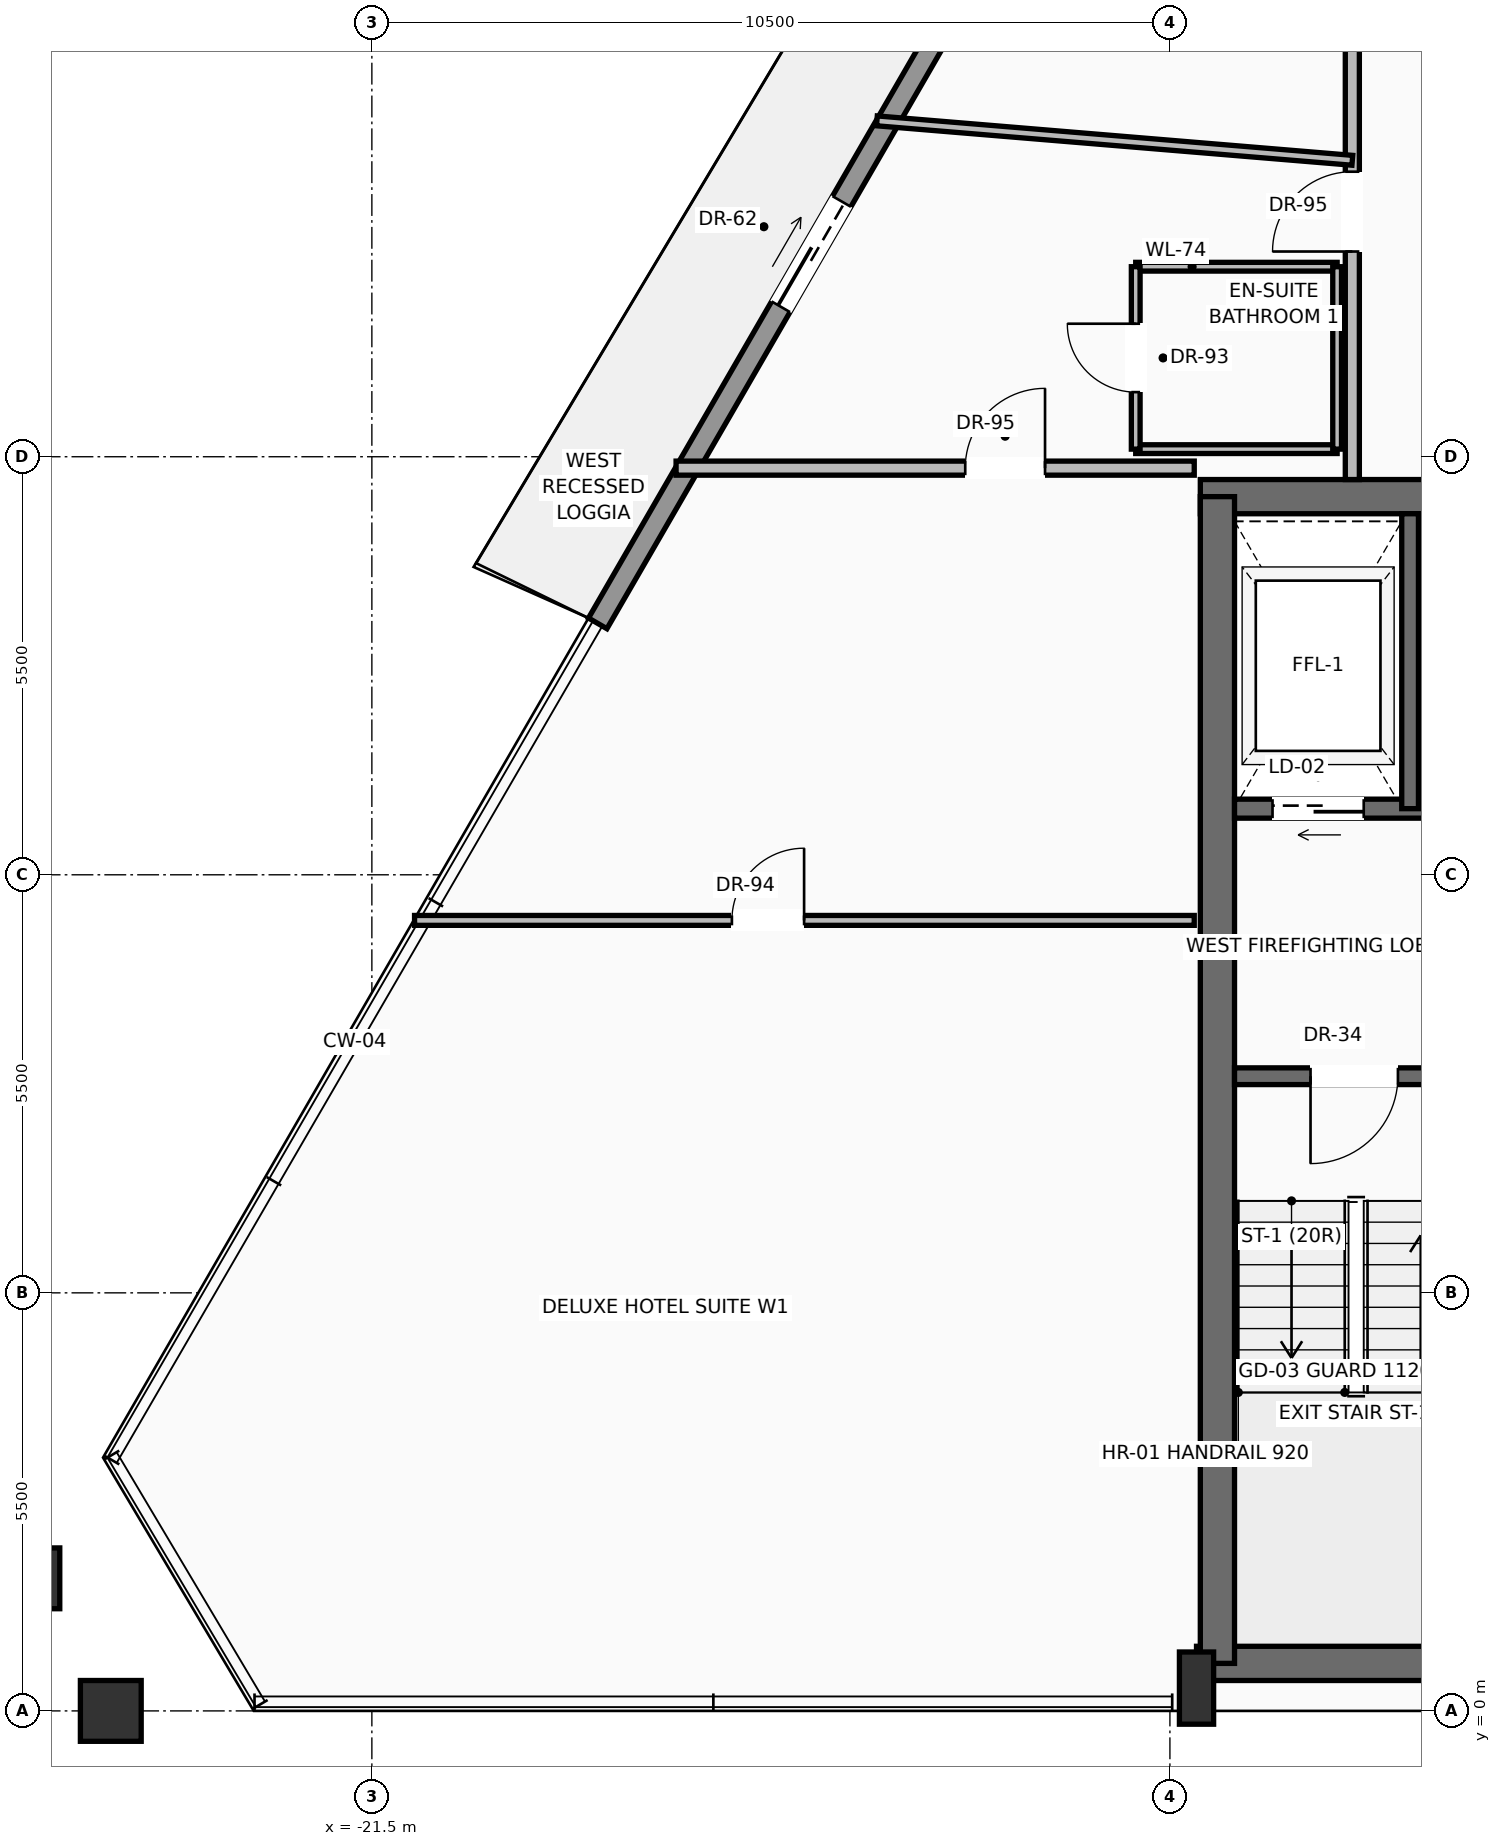
"""IFC4 building model, lengths in metres.
Left out: names, types, materials, properties, quantities, classifications, styles, units other than length and angle.
Written with IfcOpenShell. Run it as: python <this file> out.ifc"""

import sys

from ifc_helpers import new_model, si_unit, direction, frame, frame_2d, origin, origin_2d, place, context, subcontext, project, spatial, rectangle, hollow_rectangle, extrude, source, transform, mapped, element, fill, save


model = new_model("IFC4")
c1 = context("Model", 3, precision=1e-05, world=origin(), true_north=direction((0.0, 1.0)))
c2 = subcontext(c1, "Body", "Model", "MODEL_VIEW")
j1 = project(units=[si_unit("LENGTHUNIT", "METRE"), si_unit("PLANEANGLEUNIT", "RADIAN")], contexts=[c1])
p1 = place(None, origin())
s1 = spatial("IfcSite", under=j1, at=p1, CompositionType="ELEMENT")
p2 = place(p1, origin())
s2 = spatial("IfcBuilding", under=s1, at=p2, CompositionType="ELEMENT")
p3 = place(p2, frame((0.0, 0.0, 273.0)))
s3 = spatial("IfcBuildingStorey", under=s2, at=p3, CompositionType="ELEMENT", Elevation=273.0)
p4 = place(p3, frame((-10.65, 0.625, 0.0), z_axis=(0.0, 0.0, 1.0), x_axis=(1.0, 0.0, 0.0)))
e1 = element("IfcWall", 1, at=p4, inside=s3, PredefinedType="SHEAR", context=c2, shape_type="SweptSolid", body=[
    extrude(rectangle(XDim=21.3, YDim=0.45, at=frame_2d((10.65, 0.0))), origin(), (0.0, 0.0, 1.0), 3.24),
])
p5 = place(p3, frame((-10.6, 15.975, 0.0), z_axis=(0.0, 0.0, 1.0), x_axis=(1.0, 0.0, 0.0)))
e2 = element("IfcWall", 2, at=p5, inside=s3, PredefinedType="SHEAR", context=c2, shape_type="SweptSolid", body=[
    extrude(rectangle(XDim=21.2, YDim=0.45, at=frame_2d((10.6, 0.0))), origin(), (0.0, 0.0, 1.0), 3.24),
])
p6 = place(p5, frame((3.17, 0.0, 0.0)))
e3 = element("IfcOpeningElement", 3, at=p6, cuts=e2, PredefinedType="OPENING", context=c2, shape_type="SweptSolid", body=[
    extrude(rectangle(XDim=1.3, YDim=2.3, at=frame_2d((0.65, 1.15))), frame((0.0, 0.235, 0.0), z_axis=(0.0, -1.0, 0.0), x_axis=(1.0, 0.0, 0.0)), (0.0, 0.0, 1.0), 0.47),
])
p7 = place(p5, frame((9.6, 0.0, 0.0)))
e4 = element("IfcOpeningElement", 4, at=p7, cuts=e2, PredefinedType="OPENING", context=c2, shape_type="SweptSolid", body=[
    extrude(rectangle(XDim=2.0, YDim=2.4, at=frame_2d((1.0, 1.2))), frame((0.0, 0.235, 0.0), z_axis=(0.0, -1.0, 0.0), x_axis=(1.0, 0.0, 0.0)), (0.0, 0.0, 1.0), 0.47),
])
p8 = place(p3, frame((-10.375, 0.625, 0.0), z_axis=(0.0, 0.0, 1.0), x_axis=(0.0, 1.0, 0.0)))
e5 = element("IfcWall", 5, at=p8, inside=s3, PredefinedType="SHEAR", context=c2, shape_type="SweptSolid", body=[
    extrude(rectangle(XDim=15.35, YDim=0.45, at=frame_2d((7.675, 0.0))), origin(), (0.0, 0.0, 1.0), 3.24),
])
m1 = source(origin(), c2, "Body", "SweptSolid", [
    extrude(rectangle(XDim=0.45, YDim=0.95, at=origin_2d()), origin(), (0.0, 0.0, 1.0), 3.45),
])
p9 = place(p3, frame((-10.65, 0.3, 0.0), z_axis=(0.0, 0.0, 1.0), x_axis=(1.0, 0.0, 0.0)))
e6 = element("IfcColumn", 6, at=p9, inside=s3, PredefinedType="PILASTER", context=c2, shape_type="MappedRepresentation", body=[
    mapped(m1, transform((0.0, 0.0, 0.0), scale=1.0)),
])
m2 = source(origin(), c2, "Body", "SweptSolid", [
    extrude(hollow_rectangle(XDim=0.8, YDim=0.8, WallThickness=0.04, at=origin_2d()), origin(), (0.0, 0.0, 1.0), 3.441),
])
p10 = place(p3, frame((-24.935, 0.0, 0.004), z_axis=(0.000851365424, 0.0, 0.999999637588), x_axis=(1.0, 0.0, 0.0)))
e7 = element("IfcColumn", 7, at=p10, inside=s3, PredefinedType="COLUMN", context=c2, shape_type="MappedRepresentation", body=[
    mapped(m2, transform((0.0, 0.0, 0.0), scale=1.0)),
])
m3 = source(origin(), c2, "Body", "SweptSolid", [
    extrude(hollow_rectangle(XDim=0.8, YDim=0.8, WallThickness=0.04, at=origin_2d()), origin(), (0.0, 0.0, 1.0), 3.442),
])
p11 = place(p3, frame((-26.006, 1.744, 0.004), z_axis=(0.01220033377, -0.016527196327, 0.999788979554), x_axis=(0.804534796684, 0.593905515149, 0.0)))
e8 = element("IfcColumn", 8, at=p11, inside=s3, PredefinedType="COLUMN", context=c2, shape_type="MappedRepresentation", body=[
    mapped(m3, transform((0.0, 0.0, 0.0), scale=1.0)),
])
p12 = place(p3, frame((-18.529, 14.308, 0.0), z_axis=(0.0, 0.0, 1.0), x_axis=(0.500615740451, 0.86566961389, 0.0)))
e9 = element("IfcWall", 9, at=p12, inside=s3, PredefinedType="SOLIDWALL", context=c2, shape_type="SweptSolid", body=[
    extrude(rectangle(XDim=20.05, YDim=0.28, at=frame_2d((10.025, 0.0))), origin(), (0.0, 0.0, 1.0), 2.82),
])
p13 = place(p12, frame((4.812, 0.0, 0.0)))
e10 = element("IfcOpeningElement", 10, at=p13, cuts=e9, PredefinedType="OPENING", context=c2, shape_type="SweptSolid", body=[
    extrude(rectangle(XDim=1.6, YDim=2.35, at=frame_2d((0.8, 1.175))), frame((0.0, 0.15, 0.0), z_axis=(0.0, -1.0, 0.0), x_axis=(1.0, 0.0, 0.0)), (0.0, 0.0, 1.0), 0.3),
])
p14 = place(p12, frame((13.634, 0.0, 0.9)))
e11 = element("IfcOpeningElement", 11, at=p14, cuts=e9, PredefinedType="OPENING", context=c2, shape_type="SweptSolid", body=[
    extrude(rectangle(XDim=1.55, YDim=1.75, at=frame_2d((0.775, 0.875))), frame((0.0, 0.15, 0.0), z_axis=(0.0, -1.0, 0.0), x_axis=(1.0, 0.0, 0.0)), (0.0, 0.0, 1.0), 0.3),
])
p15 = place(p3, frame((-5.5, 8.35, 0.0), z_axis=(0.0, 0.0, 1.0), x_axis=(-1.0, 0.0, 0.0)))
e12 = element("IfcWall", 12, at=p15, inside=s3, PredefinedType="SOLIDWALL", context=c2, shape_type="SweptSolid", body=[
    extrude(rectangle(XDim=4.65, YDim=0.22, at=frame_2d((2.325, 0.0))), origin(), (0.0, 0.0, 1.0), 3.24),
])
p16 = place(p15, frame((2.5, 0.0, 0.0)))
e13 = element("IfcOpeningElement", 13, at=p16, cuts=e12, PredefinedType="OPENING", context=c2, shape_type="SweptSolid", body=[
    extrude(rectangle(XDim=1.15, YDim=2.2, at=frame_2d((0.575, 1.1))), frame((0.0, 0.12, 0.0), z_axis=(0.0, -1.0, 0.0), x_axis=(1.0, 0.0, 0.0)), (0.0, 0.0, 1.0), 0.24),
])
p17 = place(p3, frame((-5.5, 11.87, 0.0), z_axis=(0.0, 0.0, 1.0), x_axis=(-1.0, 0.0, 0.0)))
e14 = element("IfcWall", 14, at=p17, inside=s3, PredefinedType="SOLIDWALL", context=c2, shape_type="SweptSolid", body=[
    extrude(rectangle(XDim=4.65, YDim=0.25, at=frame_2d((2.325, 0.0))), origin(), (0.0, 0.0, 1.0), 3.24),
])
p18 = place(p17, frame((2.95, 0.0, 0.0)))
e15 = element("IfcOpeningElement", 15, at=p18, cuts=e14, PredefinedType="OPENING", context=c2, shape_type="SweptSolid", body=[
    extrude(rectangle(XDim=1.2, YDim=2.25, at=frame_2d((0.6, 1.125))), frame((0.0, 0.135, 0.0), z_axis=(0.0, -1.0, 0.0), x_axis=(1.0, 0.0, 0.0)), (0.0, 0.0, 1.0), 0.27),
])
p19 = place(p3, frame((-7.84, 11.87, 0.0), z_axis=(0.0, 0.0, 1.0), x_axis=(0.0, 1.0, 0.0)))
e16 = element("IfcWall", 16, at=p19, inside=s3, PredefinedType="SOLIDWALL", context=c2, shape_type="SweptSolid", body=[
    extrude(rectangle(XDim=3.88, YDim=0.22, at=frame_2d((1.94, 0.0))), origin(), (0.0, 0.0, 1.0), 3.24),
])
p20 = place(p3, frame((-8.6, 16.2, 0.0), z_axis=(0.0, 0.0, 1.0), x_axis=(0.0, 1.0, 0.0)))
e17 = element("IfcWall", 17, at=p20, inside=s3, PredefinedType="PARTITIONING", context=c2, shape_type="SweptSolid", body=[
    extrude(rectangle(XDim=13.8, YDim=0.185, at=frame_2d((6.9, 0.0))), origin(), (0.0, 0.0, 1.0), 3.232),
])
p21 = place(p20, frame((3.0, 0.0, 0.0)))
e18 = element("IfcOpeningElement", 18, at=p21, cuts=e17, PredefinedType="OPENING", context=c2, shape_type="SweptSolid", body=[
    extrude(rectangle(XDim=1.05, YDim=2.25, at=frame_2d((0.525, 1.125))), frame((0.0, 0.103, 0.0), z_axis=(0.0, -1.0, 0.0), x_axis=(1.0, 0.0, 0.0)), (0.0, 0.0, 1.0), 0.205),
])
p22 = place(p20, frame((7.088, 0.0, 0.0)))
e19 = element("IfcOpeningElement", 19, at=p22, cuts=e17, PredefinedType="OPENING", context=c2, shape_type="SweptSolid", body=[
    extrude(rectangle(XDim=1.05, YDim=2.25, at=frame_2d((0.525, 1.125))), frame((0.0, 0.103, 0.0), z_axis=(0.0, -1.0, 0.0), x_axis=(1.0, 0.0, 0.0)), (0.0, 0.0, 1.0), 0.205),
])
p23 = place(p3, frame((-17.498, 16.35, 0.0), z_axis=(0.0, 0.0, 1.0), x_axis=(1.0, 0.0, 0.0)))
e20 = element("IfcWall", 20, at=p23, inside=s3, PredefinedType="PARTITIONING", context=c2, shape_type="SweptSolid", body=[
    extrude(rectangle(XDim=6.818, YDim=0.185, at=frame_2d((3.409, 0.0))), origin(), (0.0, 0.0, 1.0), 3.232),
])
p24 = place(p23, frame((3.804, 0.0, 0.0)))
e21 = element("IfcOpeningElement", 21, at=p24, cuts=e20, PredefinedType="OPENING", context=c2, shape_type="SweptSolid", body=[
    extrude(rectangle(XDim=1.05, YDim=2.25, at=frame_2d((0.525, 1.125))), frame((0.0, 0.103, 0.0), z_axis=(0.0, -1.0, 0.0), x_axis=(1.0, 0.0, 0.0)), (0.0, 0.0, 1.0), 0.205),
])
p25 = place(p3, frame((-20.938, 10.4, 0.0), z_axis=(0.0, 0.0, 1.0), x_axis=(1.0, 0.0, 0.0)))
e22 = element("IfcWall", 22, at=p25, inside=s3, PredefinedType="PARTITIONING", context=c2, shape_type="SweptSolid", body=[
    extrude(rectangle(XDim=10.259, YDim=0.13, at=frame_2d((5.129, 0.0))), origin(), (0.0, 0.0, 1.0), 3.232),
])
p26 = place(p25, frame((4.175, 0.0, 0.0)))
e23 = element("IfcOpeningElement", 23, at=p26, cuts=e22, PredefinedType="OPENING", context=c2, shape_type="SweptSolid", body=[
    extrude(rectangle(XDim=0.95, YDim=2.2, at=frame_2d((0.475, 1.1))), frame((0.0, 0.075, 0.0), z_axis=(0.0, -1.0, 0.0), x_axis=(1.0, 0.0, 0.0)), (0.0, 0.0, 1.0), 0.15),
])
for number, where, z_axis, x_axis in (
    (24, (-11.45, 16.6, 0.0), (0.0, 0.0, 1.0), (1.0, 0.0, 0.0)),
    (25, (-11.45, 19.0, 0.0), (0.0, 0.0, 1.0), (1.0, 0.0, 0.0)),
):
    element("IfcWall", number, at=place(p3, frame(where, z_axis=z_axis, x_axis=x_axis)), inside=s3, PredefinedType="PARTITIONING", context=c2, shape_type="SweptSolid", body=[
        extrude(rectangle(XDim=2.65, YDim=0.115, at=frame_2d((1.325, 0.0))), origin(), (0.0, 0.0, 1.0), 3.232),
    ])
p27 = place(p3, frame((-11.45, 16.6, 0.0), z_axis=(0.0, 0.0, 1.0), x_axis=(0.0, 1.0, 0.0)))
e26 = element("IfcWall", 26, at=p27, inside=s3, PredefinedType="PARTITIONING", context=c2, shape_type="SweptSolid", body=[
    extrude(rectangle(XDim=2.4, YDim=0.115, at=frame_2d((1.2, 0.0))), origin(), (0.0, 0.0, 1.0), 3.232),
])
p28 = place(p27, frame((0.75, 0.0, 0.0)))
e27 = element("IfcOpeningElement", 27, at=p28, cuts=e26, PredefinedType="OPENING", context=c2, shape_type="SweptSolid", body=[
    extrude(rectangle(XDim=0.9, YDim=2.15, at=frame_2d((0.45, 1.075))), frame((0.0, 0.067, 0.0), z_axis=(0.0, -1.0, 0.0), x_axis=(1.0, 0.0, 0.0)), (0.0, 0.0, 1.0), 0.135),
])
p29 = place(p3, frame((-8.8, 16.6, 0.0), z_axis=(0.0, 0.0, 1.0), x_axis=(0.0, 1.0, 0.0)))
e28 = element("IfcWall", 28, at=p29, inside=s3, PredefinedType="PARTITIONING", context=c2, shape_type="SweptSolid", body=[
    extrude(rectangle(XDim=2.4, YDim=0.115, at=frame_2d((1.2, 0.0))), origin(), (0.0, 0.0, 1.0), 3.232),
])
p30 = place(p3, frame((-14.855, 20.919, 0.0), z_axis=(0.0, 0.0, 1.0), x_axis=(0.996575202115, -0.082691393322, 0.0)))
e29 = element("IfcWall", 29, at=p30, inside=s3, PredefinedType="PARTITIONING", context=c2, shape_type="SweptSolid", body=[
    extrude(rectangle(XDim=6.277, YDim=0.13, at=frame_2d((3.138, 0.0))), origin(), (0.0, 0.0, 1.0), 3.232),
])
m4 = source(origin(), c2, "Body", "SweptSolid", [
    extrude(rectangle(XDim=1.6, YDim=2.35, at=frame_2d((0.8, 1.175))), frame((0.0, 0.025, 0.0), z_axis=(0.0, -1.0, 0.0), x_axis=(1.0, 0.0, 0.0)), (0.0, 0.0, 1.0), 0.05),
])
p31 = place(p13, origin())
e30 = element("IfcDoor", 30, at=p31, inside=s3, OperationType="SLIDING_TO_LEFT", PredefinedType="DOOR", context=c2, shape_type="MappedRepresentation", body=[
    mapped(m4, transform((0.0, 0.0, 0.0), scale=1.0)),
])
fill(e10, e30)
m5 = source(origin(), c2, "Body", "SweptSolid", [
    extrude(rectangle(XDim=1.15, YDim=2.2, at=frame_2d((0.575, 1.1))), frame((0.0, 0.025, 0.0), z_axis=(0.0, -1.0, 0.0), x_axis=(1.0, 0.0, 0.0)), (0.0, 0.0, 1.0), 0.05),
])
p32 = place(p16, origin())
e31 = element("IfcDoor", 31, at=p32, inside=s3, OperationType="SINGLE_SWING_RIGHT", PredefinedType="DOOR", context=c2, shape_type="MappedRepresentation", body=[
    mapped(m5, transform((0.0, 0.0, 0.0), scale=1.0)),
])
fill(e13, e31)
m6 = source(origin(), c2, "Body", "SweptSolid", [
    extrude(rectangle(XDim=1.2, YDim=2.25, at=frame_2d((0.6, 1.125))), frame((0.0, 0.025, 0.0), z_axis=(0.0, -1.0, 0.0), x_axis=(1.0, 0.0, 0.0)), (0.0, 0.0, 1.0), 0.05),
])
p33 = place(p18, origin())
e32 = element("IfcDoor", 32, at=p33, inside=s3, OperationType="SLIDING_TO_LEFT", PredefinedType="DOOR", context=c2, shape_type="MappedRepresentation", body=[
    mapped(m6, transform((0.0, 0.0, 0.0), scale=1.0)),
])
fill(e15, e32)
m7 = source(origin(), c2, "Body", "SweptSolid", [
    extrude(rectangle(XDim=1.05, YDim=2.25, at=frame_2d((0.525, 1.125))), frame((0.0, 0.025, 0.0), z_axis=(0.0, -1.0, 0.0), x_axis=(1.0, 0.0, 0.0)), (0.0, 0.0, 1.0), 0.05),
])
p34 = place(p24, origin())
e33 = element("IfcDoor", 33, at=p34, inside=s3, OperationType="SINGLE_SWING_RIGHT", PredefinedType="DOOR", context=c2, shape_type="MappedRepresentation", body=[
    mapped(m7, transform((0.0, 0.0, 0.0), scale=1.0)),
])
fill(e21, e33)
m8 = source(origin(), c2, "Body", "SweptSolid", [
    extrude(rectangle(XDim=0.95, YDim=2.2, at=frame_2d((0.475, 1.1))), frame((0.0, 0.025, 0.0), z_axis=(0.0, -1.0, 0.0), x_axis=(1.0, 0.0, 0.0)), (0.0, 0.0, 1.0), 0.05),
])
p35 = place(p26, origin())
e34 = element("IfcDoor", 34, at=p35, inside=s3, OperationType="SINGLE_SWING_RIGHT", PredefinedType="DOOR", context=c2, shape_type="MappedRepresentation", body=[
    mapped(m8, transform((0.0, 0.0, 0.0), scale=1.0)),
])
fill(e23, e34)
p36 = place(p21, origin())
e35 = element("IfcDoor", 35, at=p36, inside=s3, OperationType="SINGLE_SWING_LEFT", PredefinedType="DOOR", context=c2, shape_type="MappedRepresentation", body=[
    mapped(m7, transform((0.0, 0.0, 0.0), scale=1.0)),
])
fill(e18, e35)
m9 = source(origin(), c2, "Body", "SweptSolid", [
    extrude(rectangle(XDim=0.9, YDim=2.15, at=frame_2d((0.45, 1.075))), frame((0.0, 0.025, 0.0), z_axis=(0.0, -1.0, 0.0), x_axis=(1.0, 0.0, 0.0)), (0.0, 0.0, 1.0), 0.05),
])
p37 = place(p28, origin())
e36 = element("IfcDoor", 36, at=p37, inside=s3, OperationType="SINGLE_SWING_RIGHT", PredefinedType="DOOR", context=c2, shape_type="MappedRepresentation", body=[
    mapped(m9, transform((0.0, 0.0, 0.0), scale=1.0)),
])
fill(e27, e36)
save(model, sys.argv[1])
